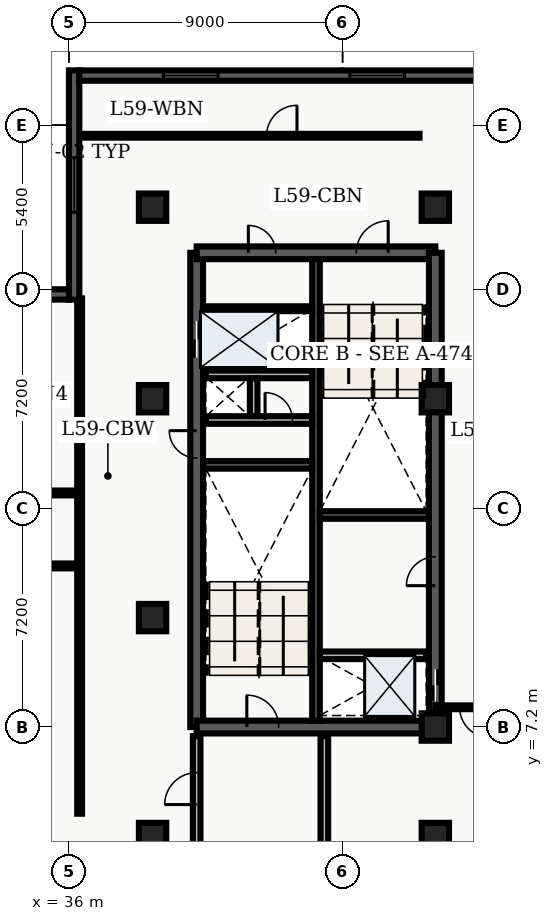
"""IFC4 building model, lengths in metres.
Left out: names, types, materials, properties, quantities, classifications, styles, units other than length and angle.
Written with IfcOpenShell. Run it as: python <this file> out.ifc"""

import sys

from ifc_helpers import new_model, entity, si_unit, converted_unit, direction, frame, origin_with_axes, origin_2d_with_axis, place, context, subcontext, project, spatial, polyline, rectangle, outline, extrude, element, fill, save


model = new_model("IFC4")
c1 = context("Model", 3, precision=1e-05, world=origin_with_axes(), true_north=direction((0.0, 1.0)))
c2 = subcontext(c1, "Body", "Model", "MODEL_VIEW")
j1 = project(units=[si_unit("LENGTHUNIT", "METRE"), converted_unit("PLANEANGLEUNIT", "DEGREE", entity("IfcPlaneAngleMeasure", 0.017), si_unit("PLANEANGLEUNIT", "RADIAN"), dimensions=[0, 0, 0, 0, 0, 0, 0])], contexts=[c1])
p1 = place(None, origin_with_axes())
s1 = spatial("IfcSite", under=j1, at=p1, CompositionType="ELEMENT")
p2 = place(p1, origin_with_axes())
s2 = spatial("IfcBuilding", under=s1, at=p2, CompositionType="ELEMENT")
p3 = place(p2, frame((0.0, 0.0, 240.3), z_axis=(0.0, 0.0, 1.0), x_axis=(1.0, 0.0, 0.0)))
s3 = spatial("IfcBuildingStorey", under=s2, at=p3, CompositionType="ELEMENT", Elevation=240.3)
p4 = place(p3, frame((40.2, 7.2, 0.0), z_axis=(0.0, 0.0, 1.0), x_axis=(0.0, 1.0, 0.0)))
e1 = element("IfcWall", 1, at=p4, inside=s3, PredefinedType="SHEAR", context=c2, shape_type="SweptSolid", body=[
    extrude(outline(polyline([(0.0, -0.21), (15.6, -0.21), (15.6, 0.21), (0.0, 0.21), (0.0, -0.21)])), origin_with_axes(), (0.0, 0.0, 1.0), 3.66),
])
p5 = place(p4, frame((12.75, 0.0, 0.0), z_axis=(0.0, 0.0, 1.0), x_axis=(1.0, 0.0, 0.0)))
e2 = element("IfcOpeningElement", 2, at=p5, cuts=e1, PredefinedType="OPENING", context=c2, shape_type="SweptSolid", body=[
    extrude(rectangle(XDim=1.2, YDim=0.44, at=origin_2d_with_axis()), origin_with_axes(), (0.0, 0.0, 1.0), 2.15),
])
p6 = place(p4, frame((9.3, 0.0, 0.0), z_axis=(0.0, 0.0, 1.0), x_axis=(1.0, 0.0, 0.0)))
e3 = element("IfcOpeningElement", 3, at=p6, cuts=e1, PredefinedType="OPENING", context=c2, shape_type="SweptSolid", body=[
    extrude(rectangle(XDim=0.9, YDim=0.44, at=origin_2d_with_axis()), origin_with_axes(), (0.0, 0.0, 1.0), 2.15),
])
p7 = place(p3, frame((40.2, 7.2, 0.0), z_axis=(0.0, 0.0, 1.0), x_axis=(1.0, 0.0, 0.0)))
e4 = element("IfcWall", 4, at=p7, inside=s3, PredefinedType="SHEAR", context=c2, shape_type="SweptSolid", body=[
    extrude(outline(polyline([(0.0, -0.21), (7.85, -0.21), (7.85, 0.21), (0.0, 0.21), (0.0, -0.21)])), origin_with_axes(), (0.0, 0.0, 1.0), 3.66),
])
p8 = place(p7, frame((2.175, 0.0, 0.0), z_axis=(0.0, 0.0, 1.0), x_axis=(1.0, 0.0, 0.0)))
e5 = element("IfcOpeningElement", 5, at=p8, cuts=e4, PredefinedType="OPENING", context=c2, shape_type="SweptSolid", body=[
    extrude(rectangle(XDim=1.05, YDim=0.44, at=origin_2d_with_axis()), origin_with_axes(), (0.0, 0.0, 1.0), 2.15),
])
p9 = place(p3, frame((40.2, 22.8, 0.0), z_axis=(0.0, 0.0, 1.0), x_axis=(1.0, 0.0, 0.0)))
e6 = element("IfcWall", 6, at=p9, inside=s3, PredefinedType="SHEAR", context=c2, shape_type="SweptSolid", body=[
    extrude(outline(polyline([(0.0, -0.21), (7.85, -0.21), (7.85, 0.21), (0.0, 0.21), (0.0, -0.21)])), origin_with_axes(), (0.0, 0.0, 1.0), 3.66),
])
p10 = place(p9, frame((5.775, 0.0, 0.0), z_axis=(0.0, 0.0, 1.0), x_axis=(1.0, 0.0, 0.0)))
e7 = element("IfcOpeningElement", 7, at=p10, cuts=e6, PredefinedType="OPENING", context=c2, shape_type="SweptSolid", body=[
    extrude(rectangle(XDim=1.05, YDim=0.44, at=origin_2d_with_axis()), origin_with_axes(), (0.0, 0.0, 1.0), 2.15),
])
p11 = place(p9, frame((2.15, 0.0, 0.0), z_axis=(0.0, 0.0, 1.0), x_axis=(1.0, 0.0, 0.0)))
e8 = element("IfcOpeningElement", 8, at=p11, cuts=e6, PredefinedType="OPENING", context=c2, shape_type="SweptSolid", body=[
    extrude(rectangle(XDim=0.9, YDim=0.44, at=origin_2d_with_axis()), origin_with_axes(), (0.0, 0.0, 1.0), 2.15),
])
p12 = place(p3, frame((48.05, 7.2, 0.0), z_axis=(0.0, 0.0, 1.0), x_axis=(0.0, 1.0, 0.0)))
e9 = element("IfcWall", 9, at=p12, inside=s3, PredefinedType="SHEAR", context=c2, shape_type="SweptSolid", body=[
    extrude(outline(polyline([(0.0, -0.21), (15.6, -0.21), (15.6, 0.21), (0.0, 0.21), (0.0, -0.21)])), origin_with_axes(), (0.0, 0.0, 1.0), 3.66),
])
p13 = place(p12, frame((1.375, 0.0, 0.0), z_axis=(0.0, 0.0, 1.0), x_axis=(1.0, 0.0, 0.0)))
e10 = element("IfcOpeningElement", 10, at=p13, cuts=e9, PredefinedType="OPENING", context=c2, shape_type="SweptSolid", body=[
    extrude(rectangle(XDim=1.05, YDim=0.44, at=origin_2d_with_axis()), origin_with_axes(), (0.0, 0.0, 1.0), 2.15),
])
p14 = place(p12, frame((5.125, 0.0, 0.0), z_axis=(0.0, 0.0, 1.0), x_axis=(1.0, 0.0, 0.0)))
e11 = element("IfcOpeningElement", 11, at=p14, cuts=e9, PredefinedType="OPENING", context=c2, shape_type="SweptSolid", body=[
    extrude(rectangle(XDim=0.95, YDim=0.44, at=origin_2d_with_axis()), origin_with_axes(), (0.0, 0.0, 1.0), 2.15),
])
p15 = place(p3, frame((44.125, 7.41, 0.0), z_axis=(0.0, 0.0, 1.0), x_axis=(0.0, 1.0, 0.0)))
e12 = element("IfcWall", 12, at=p15, inside=s3, PredefinedType="SHEAR", context=c2, shape_type="SweptSolid", body=[
    extrude(outline(polyline([(0.0, -0.125), (15.18, -0.125), (15.18, 0.125), (0.0, 0.125), (0.0, -0.125)])), origin_with_axes(), (0.0, 0.0, 1.0), 3.66),
])
for number, where, z_axis, x_axis in (
    (13, (40.41, 15.825, 0.0), (0.0, 0.0, 1.0), (1.0, 0.0, 0.0)),
    (14, (44.25, 14.175, 0.0), (0.0, 0.0, 1.0), (1.0, 0.0, 0.0)),
):
    element("IfcWall", number, at=place(p3, frame(where, z_axis=z_axis, x_axis=x_axis)), inside=s3, PredefinedType="SHEAR", context=c2, shape_type="SweptSolid", body=[
        extrude(outline(polyline([(0.0, -0.125), (3.59, -0.125), (3.59, 0.125), (0.0, 0.125), (0.0, -0.125)])), origin_with_axes(), (0.0, 0.0, 1.0), 3.66),
    ])
p16 = place(p3, frame((40.5, 17.3, 0.0), z_axis=(0.0, 0.0, 1.0), x_axis=(1.0, 0.0, 0.0)))
e15 = element("IfcWall", 15, at=p16, inside=s3, PredefinedType="SOLIDWALL", context=c2, shape_type="SweptSolid", body=[
    extrude(outline(polyline([(0.0, -0.125), (3.5, -0.125), (3.5, 0.125), (0.0, 0.125), (0.0, -0.125)])), origin_with_axes(), (0.0, 0.0, 1.0), 2.7),
])
p17 = place(p16, frame((2.4, 0.0, 0.0), z_axis=(0.0, 0.0, 1.0), x_axis=(1.0, 0.0, 0.0)))
e16 = element("IfcOpeningElement", 16, at=p17, cuts=e15, PredefinedType="OPENING", context=c2, shape_type="SweptSolid", body=[
    extrude(rectangle(XDim=0.9, YDim=0.27, at=origin_2d_with_axis()), origin_with_axes(), (0.0, 0.0, 1.0), 2.15),
])
p18 = place(p3, frame((40.5, 18.8, 0.0), z_axis=(0.0, 0.0, 1.0), x_axis=(1.0, 0.0, 0.0)))
e17 = element("IfcWall", 17, at=p18, inside=s3, PredefinedType="SOLIDWALL", context=c2, shape_type="SweptSolid", body=[
    extrude(outline(polyline([(0.0, -0.125), (3.5, -0.125), (3.5, 0.125), (0.0, 0.125), (0.0, -0.125)])), origin_with_axes(), (0.0, 0.0, 1.0), 2.7),
])
p19 = place(p3, frame((42.075, 17.43, 0.0), z_axis=(0.0, 0.0, 1.0), x_axis=(0.0, 1.0, 0.0)))
e18 = element("IfcWall", 18, at=p19, inside=s3, PredefinedType="SOLIDWALL", context=c2, shape_type="SweptSolid", body=[
    extrude(outline(polyline([(0.0, -0.125), (1.24, -0.125), (1.24, 0.125), (0.0, 0.125), (0.0, -0.125)])), origin_with_axes(), (0.0, 0.0, 1.0), 2.7),
])
p20 = place(p3, frame((40.2, 3.1, 0.0), z_axis=(0.0, 0.0, 1.0), x_axis=(0.0, 1.0, 0.0)))
e19 = element("IfcWall", 19, at=p20, inside=s3, PredefinedType="SOLIDWALL", context=c2, shape_type="SweptSolid", body=[
    extrude(outline(polyline([(0.0, -0.125), (3.8, -0.125), (3.8, 0.125), (0.0, 0.125), (0.0, -0.125)])), origin_with_axes(), (0.0, 0.0, 1.0), 2.7),
])
p21 = place(p20, frame((2.075, 0.0, 0.0), z_axis=(0.0, 0.0, 1.0), x_axis=(1.0, 0.0, 0.0)))
e20 = element("IfcOpeningElement", 20, at=p21, cuts=e19, PredefinedType="OPENING", context=c2, shape_type="SweptSolid", body=[
    extrude(rectangle(XDim=1.05, YDim=0.27, at=origin_2d_with_axis()), origin_with_axes(), (0.0, 0.0, 1.0), 2.15),
])
p22 = place(p3, frame((44.4, 3.1, 0.0), z_axis=(0.0, 0.0, 1.0), x_axis=(0.0, 1.0, 0.0)))
e21 = element("IfcWall", 21, at=p22, inside=s3, PredefinedType="SOLIDWALL", context=c2, shape_type="SweptSolid", body=[
    extrude(outline(polyline([(0.0, -0.125), (3.8, -0.125), (3.8, 0.125), (0.0, 0.125), (0.0, -0.125)])), origin_with_axes(), (0.0, 0.0, 1.0), 2.7),
])
for number, where, z_axis, x_axis in (
    (22, (38.75, 3.6, 0.0), (0.0, 0.0, 1.0), (1.0, 0.0, 0.0)),
    (23, (38.75, 10.8, 0.0), (0.0, 0.0, 1.0), (1.0, 0.0, 0.0)),
    (24, (38.75, 18.0, 0.0), (0.0, 0.0, 1.0), (1.0, 0.0, 0.0)),
    (25, (38.75, 24.3, 0.0), (0.0, 0.0, 1.0), (1.0, 0.0, 0.0)),
    (26, (48.05, 3.6, 0.0), (0.0, 0.0, 1.0), (1.0, 0.0, 0.0)),
    (27, (48.05, 7.2, 0.0), (0.0, 0.0, 1.0), (1.0, 0.0, 0.0)),
    (28, (48.05, 18.0, 0.0), (0.0, 0.0, 1.0), (1.0, 0.0, 0.0)),
    (29, (48.05, 24.3, 0.0), (0.0, 0.0, 1.0), (1.0, 0.0, 0.0)),
):
    element("IfcColumn", number, at=place(p3, frame(where, z_axis=z_axis, x_axis=x_axis)), inside=s3, PredefinedType="COLUMN", context=c2, shape_type="SweptSolid", body=[
        extrude(rectangle(XDim=0.9, YDim=0.9, at=origin_2d_with_axis()), origin_with_axes(), (0.0, 0.0, 1.0), 3.9),
    ])
p23 = place(p3, frame((40.5, 20.96, 0.0), z_axis=(0.0, 0.0, 1.0), x_axis=(1.0, 0.0, 0.0)))
e30 = element("IfcWall", 30, at=p23, inside=s3, PredefinedType="PARTITIONING", context=c2, shape_type="SweptSolid", body=[
    extrude(outline(polyline([(0.0, -0.08), (3.5, -0.08), (3.5, 0.08), (0.0, 0.08), (0.0, -0.08)])), origin_with_axes(), (0.0, 0.0, 1.0), 2.7),
])
p24 = place(p3, frame((44.25, 9.56, 0.0), z_axis=(0.0, 0.0, 1.0), x_axis=(1.0, 0.0, 0.0)))
e31 = element("IfcWall", 31, at=p24, inside=s3, PredefinedType="SOLIDWALL", context=c2, shape_type="SweptSolid", body=[
    extrude(outline(polyline([(0.0, -0.125), (3.5, -0.125), (3.5, 0.125), (0.0, 0.125), (0.0, -0.125)])), origin_with_axes(), (0.0, 0.0, 1.0), 2.7),
])
p25 = place(p3, frame((20.3, 12.5, 0.0), z_axis=(0.0, 0.0, 1.0), x_axis=(1.0, 0.0, 0.0)))
e32 = element("IfcWall", 32, at=p25, inside=s3, PredefinedType="PARTITIONING", context=c2, shape_type="SweptSolid", body=[
    extrude(outline(polyline([(0.0, -0.08), (16.05, -0.08), (16.05, 0.08), (0.0, 0.08), (0.0, -0.08)])), origin_with_axes(), (0.0, 0.0, 1.0), 2.7),
])
p26 = place(p25, frame((8.075, 0.0, 0.0), z_axis=(0.0, 0.0, 1.0), x_axis=(1.0, 0.0, 0.0)))
e33 = element("IfcOpeningElement", 33, at=p26, cuts=e32, PredefinedType="OPENING", context=c2, shape_type="SweptSolid", body=[
    extrude(rectangle(XDim=1.0, YDim=0.18, at=origin_2d_with_axis()), origin_with_axes(), (0.0, 0.0, 1.0), 2.15),
])
p27 = place(p3, frame((20.3, 14.9, 0.0), z_axis=(0.0, 0.0, 1.0), x_axis=(1.0, 0.0, 0.0)))
e34 = element("IfcWall", 34, at=p27, inside=s3, PredefinedType="PARTITIONING", context=c2, shape_type="SweptSolid", body=[
    extrude(outline(polyline([(0.0, -0.08), (16.05, -0.08), (16.05, 0.08), (0.0, 0.08), (0.0, -0.08)])), origin_with_axes(), (0.0, 0.0, 1.0), 2.7),
])
p28 = place(p27, frame((2.358, 0.0, 0.0), z_axis=(0.0, 0.0, 1.0), x_axis=(1.0, 0.0, 0.0)))
e35 = element("IfcOpeningElement", 35, at=p28, cuts=e34, PredefinedType="OPENING", context=c2, shape_type="SweptSolid", body=[
    extrude(rectangle(XDim=1.0, YDim=0.18, at=origin_2d_with_axis()), origin_with_axes(), (0.0, 0.0, 1.0), 2.15),
])
p29 = place(p27, frame((5.918, 0.0, 0.0), z_axis=(0.0, 0.0, 1.0), x_axis=(1.0, 0.0, 0.0)))
e36 = element("IfcOpeningElement", 36, at=p29, cuts=e34, PredefinedType="OPENING", context=c2, shape_type="SweptSolid", body=[
    extrude(rectangle(XDim=1.0, YDim=0.18, at=origin_2d_with_axis()), origin_with_axes(), (0.0, 0.0, 1.0), 2.15),
])
p30 = place(p27, frame((9.89, 0.0, 0.0), z_axis=(0.0, 0.0, 1.0), x_axis=(1.0, 0.0, 0.0)))
e37 = element("IfcOpeningElement", 37, at=p30, cuts=e34, PredefinedType="OPENING", context=c2, shape_type="SweptSolid", body=[
    extrude(rectangle(XDim=1.2, YDim=0.18, at=origin_2d_with_axis()), origin_with_axes(), (0.0, 0.0, 1.0), 2.2),
])
p31 = place(p27, frame((14.225, 0.0, 0.0), z_axis=(0.0, 0.0, 1.0), x_axis=(1.0, 0.0, 0.0)))
e38 = element("IfcOpeningElement", 38, at=p31, cuts=e34, PredefinedType="OPENING", context=c2, shape_type="SweptSolid", body=[
    extrude(rectangle(XDim=1.0, YDim=0.18, at=origin_2d_with_axis()), origin_with_axes(), (0.0, 0.0, 1.0), 2.15),
])
p32 = place(p3, frame((36.35, 4.35, 0.0), z_axis=(0.0, 0.0, 1.0), x_axis=(0.0, 1.0, 0.0)))
e39 = element("IfcWall", 39, at=p32, inside=s3, PredefinedType="PARTITIONING", context=c2, shape_type="SweptSolid", body=[
    extrude(outline(polyline([(0.0, -0.08), (16.95, -0.08), (16.95, 0.08), (0.0, 0.08), (0.0, -0.08)])), origin_with_axes(), (0.0, 0.0, 1.0), 2.7),
])
p33 = place(p3, frame((51.865, 7.85, 0.0), z_axis=(0.0, 0.0, 1.0), x_axis=(-1.0, 0.0, 0.0)))
e40 = element("IfcWall", 40, at=p33, inside=s3, PredefinedType="PARTITIONING", context=c2, shape_type="SweptSolid", body=[
    extrude(outline(polyline([(0.0, -0.062), (3.815, -0.062), (3.815, 0.062), (0.0, 0.062), (0.0, -0.062)])), origin_with_axes(), (0.0, 0.0, 1.0), 2.7),
])
p34 = place(p33, frame((2.515, 0.0, 0.0), z_axis=(0.0, 0.0, 1.0), x_axis=(1.0, 0.0, 0.0)))
e41 = element("IfcOpeningElement", 41, at=p34, cuts=e40, PredefinedType="OPENING", context=c2, shape_type="SweptSolid", body=[
    extrude(rectangle(XDim=1.0, YDim=0.145, at=origin_2d_with_axis()), origin_with_axes(), (0.0, 0.0, 1.0), 2.15),
])
p35 = place(p3, frame((36.335, 26.65, 0.0), z_axis=(0.0, 0.0, 1.0), x_axis=(1.0, 0.0, 0.0)))
e42 = element("IfcWall", 42, at=p35, inside=s3, PredefinedType="PARTITIONING", context=c2, shape_type="SweptSolid", body=[
    extrude(outline(polyline([(0.0, -0.062), (11.195, -0.062), (11.195, 0.062), (0.0, 0.062), (0.0, -0.062)])), origin_with_axes(), (0.0, 0.0, 1.0), 2.7),
])
p36 = place(p35, frame((6.665, 0.0, 0.0), z_axis=(0.0, 0.0, 1.0), x_axis=(1.0, 0.0, 0.0)))
e43 = element("IfcOpeningElement", 43, at=p36, cuts=e42, PredefinedType="OPENING", context=c2, shape_type="SweptSolid", body=[
    extrude(rectangle(XDim=1.0, YDim=0.145, at=origin_2d_with_axis()), origin_with_axes(), (0.0, 0.0, 1.0), 2.15),
])
p37 = place(p3, frame((36.17, 21.26, 0.0), z_axis=(0.0, 0.0, 1.0), x_axis=(0.0, 1.0, 0.0)))
e44 = element("IfcWall", 44, at=p37, inside=s3, PredefinedType="SOLIDWALL", context=c2, shape_type="SweptSolid", body=[
    extrude(outline(polyline([(0.0, -0.17), (7.54, -0.17), (7.54, 0.17), (0.0, 0.17), (0.0, -0.17)])), origin_with_axes(), (0.0, 0.0, 1.0), 3.66),
])
p38 = place(p37, frame((3.77, 0.0, 0.45), z_axis=(0.0, 0.0, 1.0), x_axis=(1.0, 0.0, 0.0)))
e45 = element("IfcOpeningElement", 45, at=p38, cuts=e44, PredefinedType="OPENING", context=c2, shape_type="SweptSolid", body=[
    extrude(rectangle(XDim=1.8, YDim=0.36, at=origin_2d_with_axis()), origin_with_axes(), (0.0, 0.0, 1.0), 2.1),
])
p39 = place(p3, frame((36.34, 28.63, 0.0), z_axis=(0.0, 0.0, 1.0), x_axis=(1.0, 0.0, 0.0)))
e46 = element("IfcWall", 46, at=p39, inside=s3, PredefinedType="SOLIDWALL", context=c2, shape_type="SweptSolid", body=[
    extrude(outline(polyline([(0.0, -0.17), (13.46, -0.17), (13.46, 0.17), (0.0, 0.17), (0.0, -0.17)])), origin_with_axes(), (0.0, 0.0, 1.0), 3.66),
])
p40 = place(p39, frame((3.665, 0.0, 0.45), z_axis=(0.0, 0.0, 1.0), x_axis=(1.0, 0.0, 0.0)))
e47 = element("IfcOpeningElement", 47, at=p40, cuts=e46, PredefinedType="OPENING", context=c2, shape_type="SweptSolid", body=[
    extrude(rectangle(XDim=1.8, YDim=0.36, at=origin_2d_with_axis()), origin_with_axes(), (0.0, 0.0, 1.0), 2.1),
])
p41 = place(p39, frame((9.795, 0.0, 0.45), z_axis=(0.0, 0.0, 1.0), x_axis=(1.0, 0.0, 0.0)))
e48 = element("IfcOpeningElement", 48, at=p41, cuts=e46, PredefinedType="OPENING", context=c2, shape_type="SweptSolid", body=[
    extrude(rectangle(XDim=1.8, YDim=0.36, at=origin_2d_with_axis()), origin_with_axes(), (0.0, 0.0, 1.0), 2.1),
])
p42 = place(p3, frame((32.06, 21.43, 0.0), z_axis=(0.0, 0.0, 1.0), x_axis=(1.0, 0.0, 0.0)))
e49 = element("IfcWall", 49, at=p42, inside=s3, PredefinedType="SOLIDWALL", context=c2, shape_type="SweptSolid", body=[
    extrude(outline(polyline([(0.0, -0.17), (3.94, -0.17), (3.94, 0.17), (0.0, 0.17), (0.0, -0.17)])), origin_with_axes(), (0.0, 0.0, 1.0), 3.66),
])
p43 = place(p12, frame((1.375, 0.0, 0.0), z_axis=(0.0, 0.0, 1.0), x_axis=(1.0, 0.0, 0.0)))
e50 = element("IfcDoor", 50, at=p43, inside=s3, OperationType="SLIDING_TO_LEFT", PredefinedType="DOOR", context=c2, shape_type="SweptSolid", body=[
    extrude(rectangle(XDim=1.05, YDim=0.09, at=origin_2d_with_axis()), origin_with_axes(), (0.0, 0.0, 1.0), 2.15),
])
fill(e10, e50)
p44 = place(p4, frame((12.75, 0.0, 0.0), z_axis=(0.0, 0.0, 1.0), x_axis=(1.0, 0.0, 0.0)))
e51 = element("IfcDoor", 51, at=p44, inside=s3, OperationType="DOUBLE_DOOR_SLIDING", PredefinedType="DOOR", context=c2, shape_type="SweptSolid", body=[
    extrude(rectangle(XDim=1.2, YDim=0.09, at=origin_2d_with_axis()), origin_with_axes(), (0.0, 0.0, 1.0), 2.15),
])
fill(e2, e51)
p45 = place(p4, frame((9.3, 0.0, 0.0), z_axis=(0.0, 0.0, 1.0), x_axis=(1.0, 0.0, 0.0)))
e52 = element("IfcDoor", 52, at=p45, inside=s3, OperationType="SINGLE_SWING_RIGHT", PredefinedType="DOOR", context=c2, shape_type="SweptSolid", body=[
    extrude(rectangle(XDim=0.9, YDim=0.09, at=origin_2d_with_axis()), origin_with_axes(), (0.0, 0.0, 1.0), 2.15),
])
fill(e3, e52)
p46 = place(p16, frame((2.4, 0.0, 0.0), z_axis=(0.0, 0.0, 1.0), x_axis=(1.0, 0.0, 0.0)))
e53 = element("IfcDoor", 53, at=p46, inside=s3, OperationType="SINGLE_SWING_LEFT", PredefinedType="DOOR", context=c2, shape_type="SweptSolid", body=[
    extrude(rectangle(XDim=0.9, YDim=0.09, at=origin_2d_with_axis()), origin_with_axes(), (0.0, 0.0, 1.0), 2.15),
])
fill(e16, e53)
p47 = place(p7, frame((2.175, 0.0, 0.0), z_axis=(0.0, 0.0, 1.0), x_axis=(1.0, 0.0, 0.0)))
e54 = element("IfcDoor", 54, at=p47, inside=s3, OperationType="SINGLE_SWING_LEFT", PredefinedType="DOOR", context=c2, shape_type="SweptSolid", body=[
    extrude(rectangle(XDim=1.05, YDim=0.09, at=origin_2d_with_axis()), origin_with_axes(), (0.0, 0.0, 1.0), 2.15),
])
fill(e5, e54)
p48 = place(p9, frame((5.775, 0.0, 0.0), z_axis=(0.0, 0.0, 1.0), x_axis=(1.0, 0.0, 0.0)))
e55 = element("IfcDoor", 55, at=p48, inside=s3, OperationType="SINGLE_SWING_RIGHT", PredefinedType="DOOR", context=c2, shape_type="SweptSolid", body=[
    extrude(rectangle(XDim=1.05, YDim=0.09, at=origin_2d_with_axis()), origin_with_axes(), (0.0, 0.0, 1.0), 2.15),
])
fill(e7, e55)
p49 = place(p20, frame((2.075, 0.0, 0.0), z_axis=(0.0, 0.0, 1.0), x_axis=(1.0, 0.0, 0.0)))
e56 = element("IfcDoor", 56, at=p49, inside=s3, OperationType="SINGLE_SWING_LEFT", PredefinedType="DOOR", context=c2, shape_type="SweptSolid", body=[
    extrude(rectangle(XDim=1.05, YDim=0.09, at=origin_2d_with_axis()), origin_with_axes(), (0.0, 0.0, 1.0), 2.15),
])
fill(e20, e56)
p50 = place(p9, frame((2.15, 0.0, 0.0), z_axis=(0.0, 0.0, 1.0), x_axis=(1.0, 0.0, 0.0)))
e57 = element("IfcDoor", 57, at=p50, inside=s3, OperationType="SINGLE_SWING_LEFT", PredefinedType="DOOR", context=c2, shape_type="SweptSolid", body=[
    extrude(rectangle(XDim=0.9, YDim=0.09, at=origin_2d_with_axis()), origin_with_axes(), (0.0, 0.0, 1.0), 2.15),
])
fill(e8, e57)
p51 = place(p12, frame((5.125, 0.0, 0.0), z_axis=(0.0, 0.0, 1.0), x_axis=(1.0, 0.0, 0.0)))
e58 = element("IfcDoor", 58, at=p51, inside=s3, OperationType="SINGLE_SWING_LEFT", PredefinedType="DOOR", context=c2, shape_type="SweptSolid", body=[
    extrude(rectangle(XDim=0.95, YDim=0.09, at=origin_2d_with_axis()), origin_with_axes(), (0.0, 0.0, 1.0), 2.15),
])
fill(e11, e58)
p52 = place(p33, frame((2.515, 0.0, 0.0), z_axis=(0.0, 0.0, 1.0), x_axis=(1.0, 0.0, 0.0)))
e59 = element("IfcDoor", 59, at=p52, inside=s3, OperationType="SINGLE_SWING_LEFT", PredefinedType="DOOR", context=c2, shape_type="SweptSolid", body=[
    extrude(rectangle(XDim=1.0, YDim=0.075, at=origin_2d_with_axis()), origin_with_axes(), (0.0, 0.0, 1.0), 2.15),
])
fill(e41, e59)
p53 = place(p35, frame((6.665, 0.0, 0.0), z_axis=(0.0, 0.0, 1.0), x_axis=(1.0, 0.0, 0.0)))
e60 = element("IfcDoor", 60, at=p53, inside=s3, OperationType="SINGLE_SWING_RIGHT", PredefinedType="DOOR", context=c2, shape_type="SweptSolid", body=[
    extrude(rectangle(XDim=1.0, YDim=0.075, at=origin_2d_with_axis()), origin_with_axes(), (0.0, 0.0, 1.0), 2.15),
])
fill(e43, e60)
p54 = place(p37, frame((3.77, 0.0, 0.45), z_axis=(0.0, 0.0, 1.0), x_axis=(1.0, 0.0, 0.0)))
e61 = element("IfcWindow", 61, at=p54, inside=s3, PredefinedType="WINDOW", context=c2, shape_type="SweptSolid", body=[
    extrude(rectangle(XDim=1.8, YDim=0.09, at=origin_2d_with_axis()), origin_with_axes(), (0.0, 0.0, 1.0), 2.1),
])
fill(e45, e61)
p55 = place(p39, frame((3.665, 0.0, 0.45), z_axis=(0.0, 0.0, 1.0), x_axis=(1.0, 0.0, 0.0)))
e62 = element("IfcWindow", 62, at=p55, inside=s3, PredefinedType="WINDOW", context=c2, shape_type="SweptSolid", body=[
    extrude(rectangle(XDim=1.8, YDim=0.09, at=origin_2d_with_axis()), origin_with_axes(), (0.0, 0.0, 1.0), 2.1),
])
fill(e47, e62)
p56 = place(p39, frame((9.795, 0.0, 0.45), z_axis=(0.0, 0.0, 1.0), x_axis=(1.0, 0.0, 0.0)))
e63 = element("IfcWindow", 63, at=p56, inside=s3, PredefinedType="WINDOW", context=c2, shape_type="SweptSolid", body=[
    extrude(rectangle(XDim=1.8, YDim=0.09, at=origin_2d_with_axis()), origin_with_axes(), (0.0, 0.0, 1.0), 2.1),
])
fill(e48, e63)
save(model, sys.argv[1])
